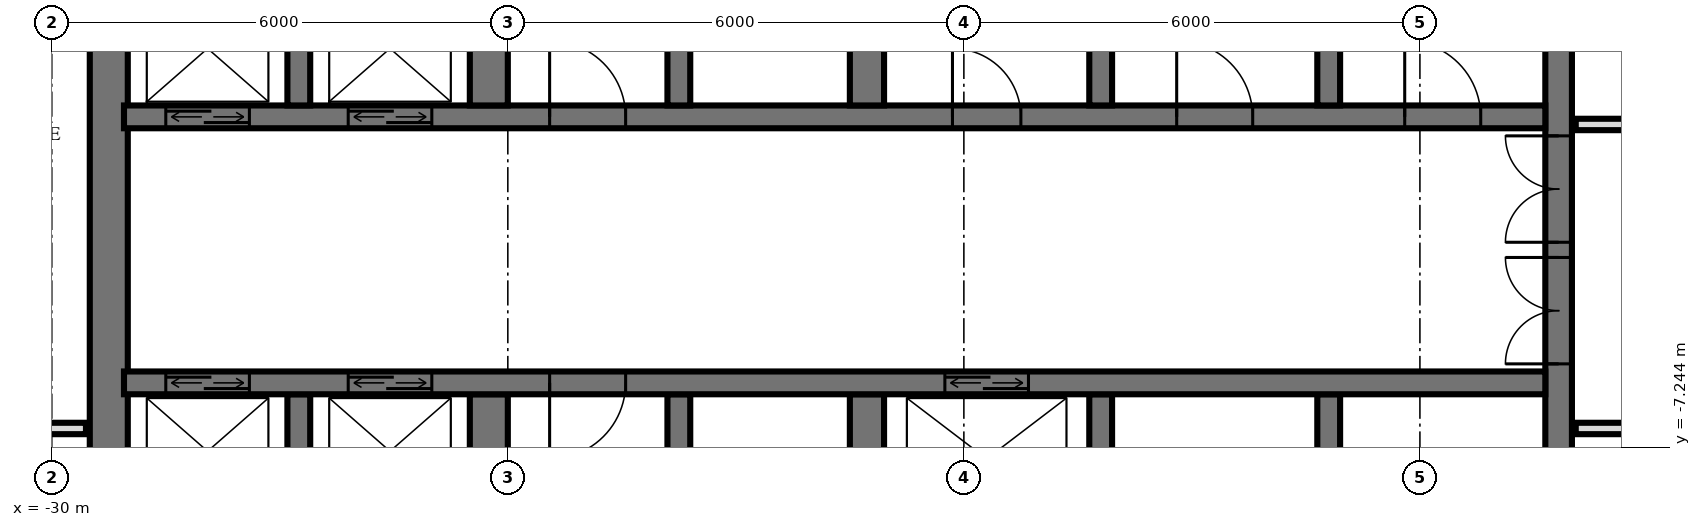
"""IFC4 building model, lengths in metres.
Left out: names, types, materials, properties, quantities, classifications, styles, units other than length and angle.
Written with IfcOpenShell. Run it as: python <this file> out.ifc"""

import sys

from ifc_helpers import new_model, si_unit, direction, frame, frame_2d, origin, place, context, subcontext, project, spatial, rectangle, extrude, element, fill, save


model = new_model("IFC4")
c1 = context("Model", 3, precision=1e-05, world=origin(), true_north=direction((0.0, 1.0)))
c2 = subcontext(c1, "Body", "Model", "MODEL_VIEW")
j1 = project(units=[si_unit("LENGTHUNIT", "METRE"), si_unit("PLANEANGLEUNIT", "RADIAN")], contexts=[c1])
p1 = place(None, origin())
s1 = spatial("IfcSite", under=j1, at=p1, CompositionType="ELEMENT")
p2 = place(p1, origin())
s2 = spatial("IfcBuilding", under=s1, at=p2, CompositionType="ELEMENT")
p3 = place(p2, frame((0.0, 0.0, 99.6)))
s3 = spatial("IfcBuildingStorey", under=s2, at=p3, CompositionType="ELEMENT", Elevation=99.6)
p4 = place(p3, frame((-10.175, -14.55, 0.0), z_axis=(0.0, 0.0, 1.0), x_axis=(0.0, 1.0, 0.0)))
e1 = element("IfcWall", 1, at=p4, inside=s3, PredefinedType="SHEAR", context=c2, shape_type="SweptSolid", body=[
    extrude(rectangle(XDim=14.1, YDim=0.35, at=frame_2d((7.05, 0.0))), origin(), (0.0, 0.0, 1.0), 3.6),
])
p5 = place(p4, frame((8.4, 0.0, 0.0)))
e2 = element("IfcOpeningElement", 2, at=p5, cuts=e1, PredefinedType="OPENING", context=c2, shape_type="SweptSolid", body=[
    extrude(rectangle(XDim=1.4, YDim=2.4, at=frame_2d((0.7, 1.2))), frame((0.0, 0.185, 0.0), z_axis=(0.0, -1.0, 0.0), x_axis=(1.0, 0.0, 0.0)), (0.0, 0.0, 1.0), 0.37),
])
p6 = place(p4, frame((10.0, 0.0, 0.0)))
e3 = element("IfcOpeningElement", 3, at=p6, cuts=e1, PredefinedType="OPENING", context=c2, shape_type="SweptSolid", body=[
    extrude(rectangle(XDim=1.4, YDim=2.4, at=frame_2d((0.7, 1.2))), frame((0.0, 0.185, 0.0), z_axis=(0.0, -1.0, 0.0), x_axis=(1.0, 0.0, 0.0)), (0.0, 0.0, 1.0), 0.37),
])
p7 = place(p4, frame((4.0, 0.0, 0.0)))
e4 = element("IfcOpeningElement", 4, at=p7, cuts=e1, PredefinedType="OPENING", context=c2, shape_type="SweptSolid", body=[
    extrude(rectangle(XDim=1.2, YDim=2.1, at=frame_2d((0.6, 1.05))), frame((0.0, 0.185, 0.0), z_axis=(0.0, -1.0, 0.0), x_axis=(1.0, 0.0, 0.0)), (0.0, 0.0, 1.0), 0.37),
])
p8 = place(p3, frame((-29.25, -14.55, 0.0), z_axis=(0.0, 0.0, 1.0), x_axis=(0.0, 1.0, 0.0)))
e5 = element("IfcWall", 5, at=p8, inside=s3, PredefinedType="SHEAR", context=c2, shape_type="SweptSolid", body=[
    extrude(rectangle(XDim=14.1, YDim=0.5, at=frame_2d((7.05, 0.0))), origin(), (0.0, 0.0, 1.0), 3.6),
])
p9 = place(p3, frame((-29.05, -2.9, 0.0), z_axis=(0.0, 0.0, 1.0), x_axis=(1.0, 0.0, 0.0)))
e6 = element("IfcWall", 6, at=p9, inside=s3, PredefinedType="SHEAR", context=c2, shape_type="SweptSolid", body=[
    extrude(rectangle(XDim=18.7, YDim=0.3, at=frame_2d((9.35, 0.0))), origin(), (0.0, 0.0, 1.0), 3.6),
])
p10 = place(p9, frame((2.95, 0.0, 0.0)))
e7 = element("IfcOpeningElement", 7, at=p10, cuts=e6, PredefinedType="OPENING", context=c2, shape_type="SweptSolid", body=[
    extrude(rectangle(XDim=1.1, YDim=2.1, at=frame_2d((0.55, 1.05))), frame((0.0, 0.16, 0.0), z_axis=(0.0, -1.0, 0.0), x_axis=(1.0, 0.0, 0.0)), (0.0, 0.0, 1.0), 0.32),
])
p11 = place(p9, frame((0.55, 0.0, 0.0)))
e8 = element("IfcOpeningElement", 8, at=p11, cuts=e6, PredefinedType="OPENING", context=c2, shape_type="SweptSolid", body=[
    extrude(rectangle(XDim=1.1, YDim=2.1, at=frame_2d((0.55, 1.05))), frame((0.0, 0.16, 0.0), z_axis=(0.0, -1.0, 0.0), x_axis=(1.0, 0.0, 0.0)), (0.0, 0.0, 1.0), 0.32),
])
p12 = place(p9, frame((10.9, 0.0, 0.0)))
e9 = element("IfcOpeningElement", 9, at=p12, cuts=e6, PredefinedType="OPENING", context=c2, shape_type="SweptSolid", body=[
    extrude(rectangle(XDim=0.9, YDim=2.1, at=frame_2d((0.45, 1.05))), frame((0.0, 0.16, 0.0), z_axis=(0.0, -1.0, 0.0), x_axis=(1.0, 0.0, 0.0)), (0.0, 0.0, 1.0), 0.32),
])
p13 = place(p9, frame((16.85, 0.0, 0.0)))
e10 = element("IfcOpeningElement", 10, at=p13, cuts=e6, PredefinedType="OPENING", context=c2, shape_type="SweptSolid", body=[
    extrude(rectangle(XDim=1.0, YDim=2.1, at=frame_2d((0.5, 1.05))), frame((0.0, 0.16, 0.0), z_axis=(0.0, -1.0, 0.0), x_axis=(1.0, 0.0, 0.0)), (0.0, 0.0, 1.0), 0.32),
])
p14 = place(p9, frame((13.85, 0.0, 0.0)))
e11 = element("IfcOpeningElement", 11, at=p14, cuts=e6, PredefinedType="OPENING", context=c2, shape_type="SweptSolid", body=[
    extrude(rectangle(XDim=1.0, YDim=2.1, at=frame_2d((0.5, 1.05))), frame((0.0, 0.16, 0.0), z_axis=(0.0, -1.0, 0.0), x_axis=(1.0, 0.0, 0.0)), (0.0, 0.0, 1.0), 0.32),
])
p15 = place(p9, frame((5.6, 0.0, 0.0)))
e12 = element("IfcOpeningElement", 12, at=p15, cuts=e6, PredefinedType="OPENING", context=c2, shape_type="SweptSolid", body=[
    extrude(rectangle(XDim=1.0, YDim=2.1, at=frame_2d((0.5, 1.05))), frame((0.0, 0.16, 0.0), z_axis=(0.0, -1.0, 0.0), x_axis=(1.0, 0.0, 0.0)), (0.0, 0.0, 1.0), 0.32),
])
p16 = place(p3, frame((-29.05, -6.4, 0.0), z_axis=(0.0, 0.0, 1.0), x_axis=(1.0, 0.0, 0.0)))
e13 = element("IfcWall", 13, at=p16, inside=s3, PredefinedType="SHEAR", context=c2, shape_type="SweptSolid", body=[
    extrude(rectangle(XDim=18.7, YDim=0.3, at=frame_2d((9.35, 0.0))), origin(), (0.0, 0.0, 1.0), 3.6),
])
p17 = place(p16, frame((2.95, 0.0, 0.0)))
e14 = element("IfcOpeningElement", 14, at=p17, cuts=e13, PredefinedType="OPENING", context=c2, shape_type="SweptSolid", body=[
    extrude(rectangle(XDim=1.1, YDim=2.1, at=frame_2d((0.55, 1.05))), frame((0.0, 0.16, 0.0), z_axis=(0.0, -1.0, 0.0), x_axis=(1.0, 0.0, 0.0)), (0.0, 0.0, 1.0), 0.32),
])
p18 = place(p16, frame((0.55, 0.0, 0.0)))
e15 = element("IfcOpeningElement", 15, at=p18, cuts=e13, PredefinedType="OPENING", context=c2, shape_type="SweptSolid", body=[
    extrude(rectangle(XDim=1.1, YDim=2.1, at=frame_2d((0.55, 1.05))), frame((0.0, 0.16, 0.0), z_axis=(0.0, -1.0, 0.0), x_axis=(1.0, 0.0, 0.0)), (0.0, 0.0, 1.0), 0.32),
])
p19 = place(p16, frame((10.8, 0.0, 0.0)))
e16 = element("IfcOpeningElement", 16, at=p19, cuts=e13, PredefinedType="OPENING", context=c2, shape_type="SweptSolid", body=[
    extrude(rectangle(XDim=1.1, YDim=2.1, at=frame_2d((0.55, 1.05))), frame((0.0, 0.16, 0.0), z_axis=(0.0, -1.0, 0.0), x_axis=(1.0, 0.0, 0.0)), (0.0, 0.0, 1.0), 0.32),
])
p20 = place(p16, frame((5.6, 0.0, 0.0)))
e17 = element("IfcOpeningElement", 17, at=p20, cuts=e13, PredefinedType="OPENING", context=c2, shape_type="SweptSolid", body=[
    extrude(rectangle(XDim=1.0, YDim=2.1, at=frame_2d((0.5, 1.05))), frame((0.0, 0.16, 0.0), z_axis=(0.0, -1.0, 0.0), x_axis=(1.0, 0.0, 0.0)), (0.0, 0.0, 1.0), 0.32),
])
for number, where, z_axis, x_axis in (
    (18, (-13.2, -2.75, 0.0), (0.0, 0.0, 1.0), (0.0, 1.0, 0.0)),
    (19, (-13.2, -8.85, 0.0), (0.0, 0.0, 1.0), (0.0, 1.0, 0.0)),
    (20, (-16.2, -2.75, 0.0), (0.0, 0.0, 1.0), (0.0, 1.0, 0.0)),
    (21, (-16.2, -8.85, 0.0), (0.0, 0.0, 1.0), (0.0, 1.0, 0.0)),
):
    element("IfcWall", number, at=place(p3, frame(where, z_axis=z_axis, x_axis=x_axis)), inside=s3, PredefinedType="SHEAR", context=c2, shape_type="SweptSolid", body=[
        extrude(rectangle(XDim=2.3, YDim=0.3, at=frame_2d((1.15, 0.0))), origin(), (0.0, 0.0, 1.0), 3.6),
    ])
for number, where, z_axis, x_axis in (
    (22, (-19.275, -2.75, 0.0), (0.0, 0.0, 1.0), (0.0, 1.0, 0.0)),
    (23, (-19.275, -8.85, 0.0), (0.0, 0.0, 1.0), (0.0, 1.0, 0.0)),
):
    element("IfcWall", number, at=place(p3, frame(where, z_axis=z_axis, x_axis=x_axis)), inside=s3, PredefinedType="SHEAR", context=c2, shape_type="SweptSolid", body=[
        extrude(rectangle(XDim=2.3, YDim=0.45, at=frame_2d((1.15, 0.0))), origin(), (0.0, 0.0, 1.0), 3.6),
    ])
for number, where, z_axis, x_axis in (
    (24, (-21.75, -2.75, 0.0), (0.0, 0.0, 1.0), (0.0, 1.0, 0.0)),
    (25, (-21.75, -8.85, 0.0), (0.0, 0.0, 1.0), (0.0, 1.0, 0.0)),
):
    element("IfcWall", number, at=place(p3, frame(where, z_axis=z_axis, x_axis=x_axis)), inside=s3, PredefinedType="SHEAR", context=c2, shape_type="SweptSolid", body=[
        extrude(rectangle(XDim=2.3, YDim=0.3, at=frame_2d((1.15, 0.0))), origin(), (0.0, 0.0, 1.0), 3.6),
    ])
for number, where, z_axis, x_axis in (
    (26, (-24.25, -2.75, 0.0), (0.0, 0.0, 1.0), (0.0, 1.0, 0.0)),
    (27, (-24.25, -8.85, 0.0), (0.0, 0.0, 1.0), (0.0, 1.0, 0.0)),
):
    element("IfcWall", number, at=place(p3, frame(where, z_axis=z_axis, x_axis=x_axis)), inside=s3, PredefinedType="SHEAR", context=c2, shape_type="SweptSolid", body=[
        extrude(rectangle(XDim=2.3, YDim=0.5, at=frame_2d((1.15, 0.0))), origin(), (0.0, 0.0, 1.0), 3.6),
    ])
for number, where, z_axis, x_axis in (
    (28, (-26.75, -2.75, 0.0), (0.0, 0.0, 1.0), (0.0, 1.0, 0.0)),
    (29, (-26.75, -8.85, 0.0), (0.0, 0.0, 1.0), (0.0, 1.0, 0.0)),
):
    element("IfcWall", number, at=place(p3, frame(where, z_axis=z_axis, x_axis=x_axis)), inside=s3, PredefinedType="SHEAR", context=c2, shape_type="SweptSolid", body=[
        extrude(rectangle(XDim=2.3, YDim=0.3, at=frame_2d((1.15, 0.0))), origin(), (0.0, 0.0, 1.0), 3.6),
    ])
p21 = place(p3, frame((-9.95, -7.0, 0.0), z_axis=(0.0, 0.0, 1.0), x_axis=(1.0, 0.0, 0.0)))
e30 = element("IfcWall", 30, at=p21, inside=s3, PredefinedType="PARTITIONING", context=c2, shape_type="SweptSolid", body=[
    extrude(rectangle(XDim=19.9, YDim=0.15, at=frame_2d((9.95, 0.0))), origin(), (0.0, 0.0, 1.0), 3.32),
])
p22 = place(p21, frame((9.45, 0.0, 0.0)))
e31 = element("IfcOpeningElement", 31, at=p22, cuts=e30, PredefinedType="OPENING", context=c2, shape_type="SweptSolid", body=[
    extrude(rectangle(XDim=1.0, YDim=2.1, at=frame_2d((0.5, 1.05))), frame((0.0, 0.085, 0.0), z_axis=(0.0, -1.0, 0.0), x_axis=(1.0, 0.0, 0.0)), (0.0, 0.0, 1.0), 0.17),
])
p23 = place(p21, frame((15.45, 0.0, 0.0)))
e32 = element("IfcOpeningElement", 32, at=p23, cuts=e30, PredefinedType="OPENING", context=c2, shape_type="SweptSolid", body=[
    extrude(rectangle(XDim=1.0, YDim=2.1, at=frame_2d((0.5, 1.05))), frame((0.0, 0.085, 0.0), z_axis=(0.0, -1.0, 0.0), x_axis=(1.0, 0.0, 0.0)), (0.0, 0.0, 1.0), 0.17),
])
p24 = place(p3, frame((-33.12, -7.0, 0.0), z_axis=(0.0, 0.0, 1.0), x_axis=(1.0, 0.0, 0.0)))
e33 = element("IfcWall", 33, at=p24, inside=s3, PredefinedType="PARTITIONING", context=c2, shape_type="SweptSolid", body=[
    extrude(rectangle(XDim=3.57, YDim=0.15, at=frame_2d((1.785, 0.0))), origin(), (0.0, 0.0, 1.0), 3.32),
])
p25 = place(p24, frame((1.27, 0.0, 0.0)))
e34 = element("IfcOpeningElement", 34, at=p25, cuts=e33, PredefinedType="OPENING", context=c2, shape_type="SweptSolid", body=[
    extrude(rectangle(XDim=0.9, YDim=2.1, at=frame_2d((0.45, 1.05))), frame((0.0, 0.085, 0.0), z_axis=(0.0, -1.0, 0.0), x_axis=(1.0, 0.0, 0.0)), (0.0, 0.0, 1.0), 0.17),
])
p26 = place(p3, frame((-9.95, -3.0, 0.0), z_axis=(0.0, 0.0, 1.0), x_axis=(1.0, 0.0, 0.0)))
e35 = element("IfcWall", 35, at=p26, inside=s3, PredefinedType="PARTITIONING", context=c2, shape_type="SweptSolid", body=[
    extrude(rectangle(XDim=19.9, YDim=0.15, at=frame_2d((9.95, 0.0))), origin(), (0.0, 0.0, 1.0), 3.32),
])
p27 = place(p26, frame((3.45, 0.0, 0.0)))
e36 = element("IfcOpeningElement", 36, at=p27, cuts=e35, PredefinedType="OPENING", context=c2, shape_type="SweptSolid", body=[
    extrude(rectangle(XDim=1.0, YDim=2.1, at=frame_2d((0.5, 1.05))), frame((0.0, 0.085, 0.0), z_axis=(0.0, -1.0, 0.0), x_axis=(1.0, 0.0, 0.0)), (0.0, 0.0, 1.0), 0.17),
])
p28 = place(p26, frame((8.95, 0.0, 0.0)))
e37 = element("IfcOpeningElement", 37, at=p28, cuts=e35, PredefinedType="OPENING", context=c2, shape_type="SweptSolid", body=[
    extrude(rectangle(XDim=1.0, YDim=2.1, at=frame_2d((0.5, 1.05))), frame((0.0, 0.085, 0.0), z_axis=(0.0, -1.0, 0.0), x_axis=(1.0, 0.0, 0.0)), (0.0, 0.0, 1.0), 0.17),
])
p29 = place(p26, frame((11.7, 0.0, 0.0)))
e38 = element("IfcOpeningElement", 38, at=p29, cuts=e35, PredefinedType="OPENING", context=c2, shape_type="SweptSolid", body=[
    extrude(rectangle(XDim=1.0, YDim=2.1, at=frame_2d((0.5, 1.05))), frame((0.0, 0.085, 0.0), z_axis=(0.0, -1.0, 0.0), x_axis=(1.0, 0.0, 0.0)), (0.0, 0.0, 1.0), 0.17),
])
p30 = place(p26, frame((16.2, 0.0, 0.0)))
e39 = element("IfcOpeningElement", 39, at=p30, cuts=e35, PredefinedType="OPENING", context=c2, shape_type="SweptSolid", body=[
    extrude(rectangle(XDim=1.0, YDim=2.1, at=frame_2d((0.5, 1.05))), frame((0.0, 0.085, 0.0), z_axis=(0.0, -1.0, 0.0), x_axis=(1.0, 0.0, 0.0)), (0.0, 0.0, 1.0), 0.17),
])
p31 = place(p10, origin())
e40 = element("IfcDoor", 40, at=p31, inside=s3, OperationType="DOUBLE_DOOR_SLIDING", PredefinedType="USERDEFINED", context=c2, shape_type="SweptSolid", body=[
    extrude(rectangle(XDim=1.1, YDim=2.1, at=frame_2d((0.55, 1.05))), frame((0.0, 0.025, 0.0), z_axis=(0.0, -1.0, 0.0), x_axis=(1.0, 0.0, 0.0)), (0.0, 0.0, 1.0), 0.05),
])
fill(e7, e40)
p32 = place(p11, origin())
e41 = element("IfcDoor", 41, at=p32, inside=s3, OperationType="DOUBLE_DOOR_SLIDING", PredefinedType="USERDEFINED", context=c2, shape_type="SweptSolid", body=[
    extrude(rectangle(XDim=1.1, YDim=2.1, at=frame_2d((0.55, 1.05))), frame((0.0, 0.025, 0.0), z_axis=(0.0, -1.0, 0.0), x_axis=(1.0, 0.0, 0.0)), (0.0, 0.0, 1.0), 0.05),
])
fill(e8, e41)
p33 = place(p17, origin())
e42 = element("IfcDoor", 42, at=p33, inside=s3, OperationType="DOUBLE_DOOR_SLIDING", PredefinedType="USERDEFINED", context=c2, shape_type="SweptSolid", body=[
    extrude(rectangle(XDim=1.1, YDim=2.1, at=frame_2d((0.55, 1.05))), frame((0.0, 0.025, 0.0), z_axis=(0.0, -1.0, 0.0), x_axis=(1.0, 0.0, 0.0)), (0.0, 0.0, 1.0), 0.05),
])
fill(e14, e42)
p34 = place(p18, origin())
e43 = element("IfcDoor", 43, at=p34, inside=s3, OperationType="DOUBLE_DOOR_SLIDING", PredefinedType="USERDEFINED", context=c2, shape_type="SweptSolid", body=[
    extrude(rectangle(XDim=1.1, YDim=2.1, at=frame_2d((0.55, 1.05))), frame((0.0, 0.025, 0.0), z_axis=(0.0, -1.0, 0.0), x_axis=(1.0, 0.0, 0.0)), (0.0, 0.0, 1.0), 0.05),
])
fill(e15, e43)
p35 = place(p19, origin())
e44 = element("IfcDoor", 44, at=p35, inside=s3, OperationType="DOUBLE_DOOR_SLIDING", PredefinedType="USERDEFINED", context=c2, shape_type="SweptSolid", body=[
    extrude(rectangle(XDim=1.1, YDim=2.1, at=frame_2d((0.55, 1.05))), frame((0.0, 0.025, 0.0), z_axis=(0.0, -1.0, 0.0), x_axis=(1.0, 0.0, 0.0)), (0.0, 0.0, 1.0), 0.05),
])
fill(e16, e44)
p36 = place(p5, origin())
e45 = element("IfcDoor", 45, at=p36, inside=s3, OperationType="DOUBLE_DOOR_SINGLE_SWING", PredefinedType="DOOR", context=c2, shape_type="SweptSolid", body=[
    extrude(rectangle(XDim=1.4, YDim=2.4, at=frame_2d((0.7, 1.2))), frame((0.0, 0.025, 0.0), z_axis=(0.0, -1.0, 0.0), x_axis=(1.0, 0.0, 0.0)), (0.0, 0.0, 1.0), 0.05),
])
fill(e2, e45)
p37 = place(p6, origin())
e46 = element("IfcDoor", 46, at=p37, inside=s3, OperationType="DOUBLE_DOOR_SINGLE_SWING", PredefinedType="DOOR", context=c2, shape_type="SweptSolid", body=[
    extrude(rectangle(XDim=1.4, YDim=2.4, at=frame_2d((0.7, 1.2))), frame((0.0, 0.025, 0.0), z_axis=(0.0, -1.0, 0.0), x_axis=(1.0, 0.0, 0.0)), (0.0, 0.0, 1.0), 0.05),
])
fill(e3, e46)
p38 = place(p12, origin())
e47 = element("IfcDoor", 47, at=p38, inside=s3, OperationType="SINGLE_SWING_RIGHT", PredefinedType="DOOR", context=c2, shape_type="SweptSolid", body=[
    extrude(rectangle(XDim=0.9, YDim=2.1, at=frame_2d((0.45, 1.05))), frame((0.0, 0.025, 0.0), z_axis=(0.0, -1.0, 0.0), x_axis=(1.0, 0.0, 0.0)), (0.0, 0.0, 1.0), 0.05),
])
fill(e9, e47)
p39 = place(p13, origin())
e48 = element("IfcDoor", 48, at=p39, inside=s3, OperationType="SINGLE_SWING_RIGHT", PredefinedType="DOOR", context=c2, shape_type="SweptSolid", body=[
    extrude(rectangle(XDim=1.0, YDim=2.1, at=frame_2d((0.5, 1.05))), frame((0.0, 0.025, 0.0), z_axis=(0.0, -1.0, 0.0), x_axis=(1.0, 0.0, 0.0)), (0.0, 0.0, 1.0), 0.05),
])
fill(e10, e48)
p40 = place(p14, origin())
e49 = element("IfcDoor", 49, at=p40, inside=s3, OperationType="SINGLE_SWING_RIGHT", PredefinedType="DOOR", context=c2, shape_type="SweptSolid", body=[
    extrude(rectangle(XDim=1.0, YDim=2.1, at=frame_2d((0.5, 1.05))), frame((0.0, 0.025, 0.0), z_axis=(0.0, -1.0, 0.0), x_axis=(1.0, 0.0, 0.0)), (0.0, 0.0, 1.0), 0.05),
])
fill(e11, e49)
p41 = place(p15, origin())
e50 = element("IfcDoor", 50, at=p41, inside=s3, OperationType="SINGLE_SWING_RIGHT", PredefinedType="DOOR", context=c2, shape_type="SweptSolid", body=[
    extrude(rectangle(XDim=1.0, YDim=2.1, at=frame_2d((0.5, 1.05))), frame((0.0, 0.025, 0.0), z_axis=(0.0, -1.0, 0.0), x_axis=(1.0, 0.0, 0.0)), (0.0, 0.0, 1.0), 0.05),
])
fill(e12, e50)
p42 = place(p20, frame((0.5, 0.0, 0.0), z_axis=(0.0, 0.0, 1.0), x_axis=(-1.0, 0.0, 0.0)))
e51 = element("IfcDoor", 51, at=p42, inside=s3, OperationType="SINGLE_SWING_LEFT", PredefinedType="DOOR", context=c2, shape_type="SweptSolid", body=[
    extrude(rectangle(XDim=1.0, YDim=2.1, at=frame_2d((0.0, 1.05))), frame((0.0, -0.025, 0.0), z_axis=(0.0, 1.0, 0.0), x_axis=(-1.0, 0.0, 0.0)), (0.0, 0.0, 1.0), 0.05),
])
fill(e17, e51)
save(model, sys.argv[1])
